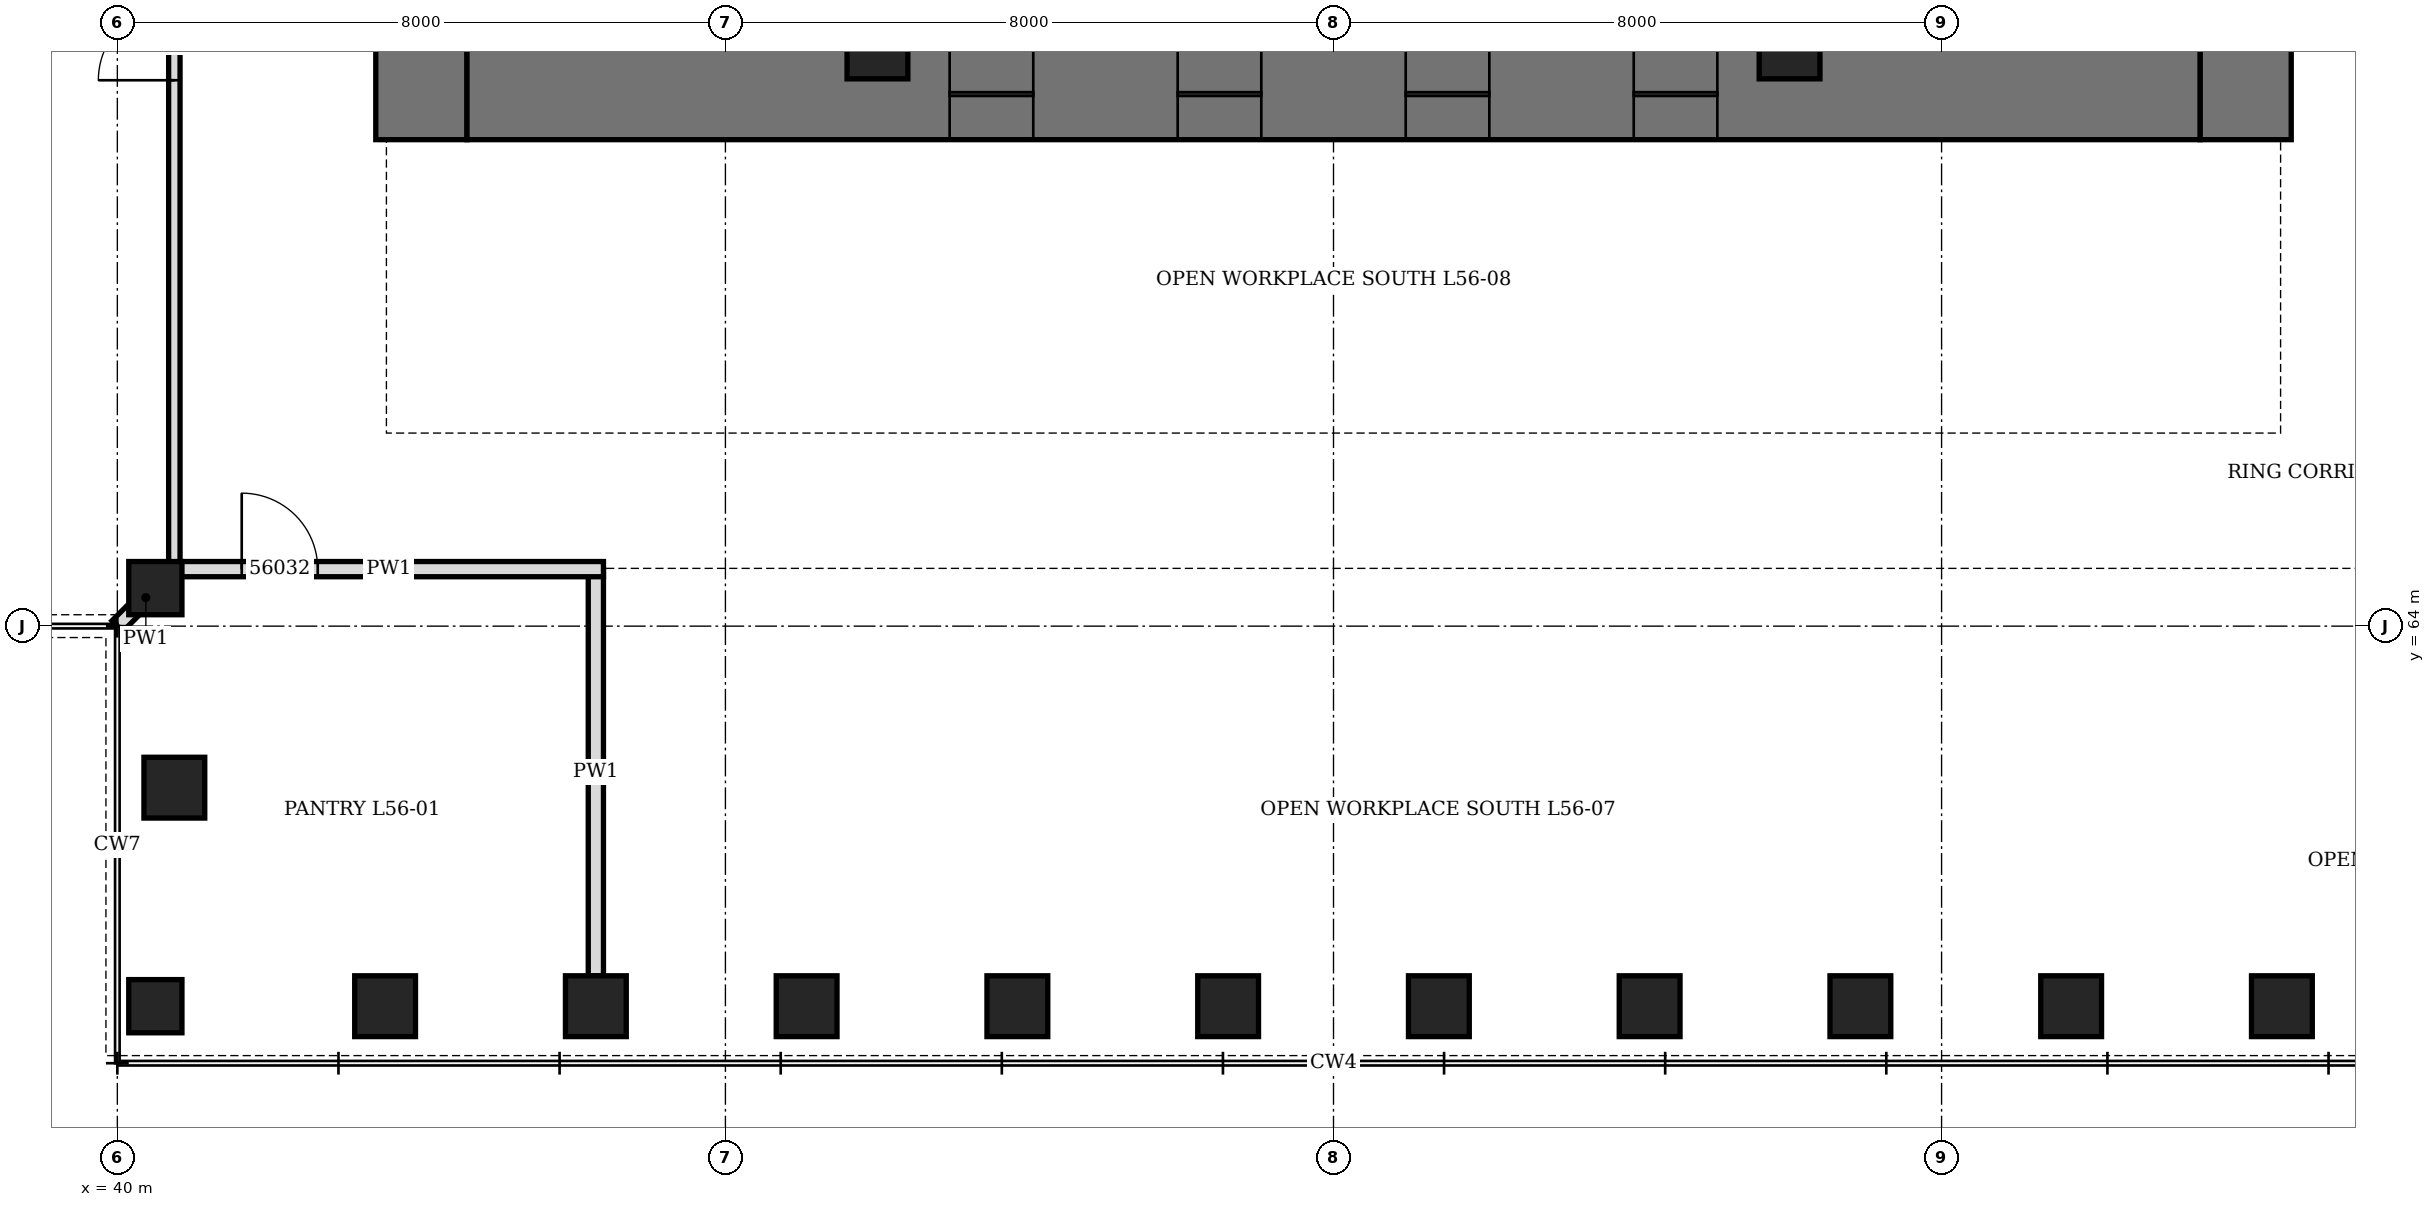
"""IFC4 building model, lengths in metres.
Left out: names, types, materials, properties, quantities, classifications, styles, units other than length and angle.
Written with IfcOpenShell. Run it as: python <this file> out.ifc"""

import sys

from ifc_helpers import new_model, si_unit, direction, frame, frame_2d, origin, origin_2d, place, context, subcontext, project, spatial, rectangle, hollow_rectangle, extrude, clip, halfspace, element, fill, save


model = new_model("IFC4")
c1 = context("Model", 3, precision=1e-05, world=origin(), true_north=direction((0.0, 1.0)))
c2 = subcontext(c1, "Body", "Model", "MODEL_VIEW")
j1 = project(units=[si_unit("LENGTHUNIT", "METRE"), si_unit("PLANEANGLEUNIT", "RADIAN")], contexts=[c1])
p1 = place(None, origin())
s1 = spatial("IfcSite", under=j1, at=p1, CompositionType="ELEMENT")
p2 = place(p1, origin())
s2 = spatial("IfcBuilding", under=s1, at=p2, CompositionType="ELEMENT")
p3 = place(p2, frame((0.0, 0.0, 250.3)))
s3 = spatial("IfcBuildingStorey", under=s2, at=p3, CompositionType="ELEMENT", Elevation=250.3)
p4 = place(p3, frame((40.5, 59.0, -0.16), z_axis=(0.057244014902, 0.0, 0.998360216935), x_axis=(0.0, 1.0, 0.0)))
e1 = element("IfcColumn", 1, at=p4, inside=s3, PredefinedType="COLUMN", context=c2, shape_type="Clipping", body=[
    clip(clip(extrude(hollow_rectangle(XDim=0.7, YDim=0.7, WallThickness=0.08, at=origin_2d()), origin(), (0.0, 0.0, 1.0), 4.367), halfspace(frame((0.0, 0.0, 0.022), z_axis=(0.0, 0.0, 1.0), x_axis=(1.0, 0.0, 0.0)), True)), halfspace(frame((0.0, 0.0, 4.345), z_axis=(0.0, 0.0, -1.0), x_axis=(1.0, 0.0, 0.0)), True)),
])
for number, where, z_axis, x_axis in (
    (2, (43.523, 59.0, -0.16), (0.0, 0.0, 1.0), (1.0, 0.0, 0.0)),
    (3, (46.295, 59.0, -0.16), (0.0, 0.0, 1.0), (1.0, 0.0, 0.0)),
    (4, (49.068, 59.0, -0.16), (0.0, 0.0, 1.0), (1.0, 0.0, 0.0)),
    (5, (51.841, 59.0, -0.16), (0.0, 0.0, 1.0), (1.0, 0.0, 0.0)),
    (6, (54.614, 59.0, -0.16), (0.0, 0.0, 1.0), (1.0, 0.0, 0.0)),
    (7, (57.386, 59.0, -0.16), (0.0, 0.0, 1.0), (1.0, 0.0, 0.0)),
    (8, (60.159, 59.0, -0.16), (0.0, 0.0, 1.0), (1.0, 0.0, 0.0)),
    (9, (62.932, 59.0, -0.16), (0.0, 0.0, 1.0), (1.0, 0.0, 0.0)),
    (10, (65.705, 59.0, -0.16), (0.0, 0.0, 1.0), (1.0, 0.0, 0.0)),
    (11, (68.477, 59.0, -0.16), (0.0, 0.0, 1.0), (1.0, 0.0, 0.0)),
):
    element("IfcColumn", number, at=place(p3, frame(where, z_axis=z_axis, x_axis=x_axis)), inside=s3, PredefinedType="COLUMN", context=c2, shape_type="SweptSolid", body=[
        extrude(hollow_rectangle(XDim=0.8, YDim=0.8, WallThickness=0.1, at=origin_2d()), origin(), (0.0, 0.0, 1.0), 4.36),
    ])
p5 = place(p3, frame((40.5, 64.5, -0.16), z_axis=(0.057150453976, 0.057150453976, 0.99672847417), x_axis=(-0.707106781187, 0.707106781187, 0.0)))
e12 = element("IfcColumn", 12, at=p5, inside=s3, PredefinedType="COLUMN", context=c2, shape_type="Clipping", body=[
    clip(clip(extrude(hollow_rectangle(XDim=0.7, YDim=0.7, WallThickness=0.08, at=origin_2d()), origin(), (0.0, 0.0, 1.0), 4.375), halfspace(frame((0.0, 0.0, 0.031), z_axis=(0.0, 0.0, 1.0), x_axis=(1.0, 0.0, 0.0)), True)), halfspace(frame((0.0, 0.0, 4.344), z_axis=(0.0, 0.0, -1.0), x_axis=(1.0, 0.0, 0.0)), True)),
])
p6 = place(p3, frame((40.75, 61.875, -0.16), z_axis=(0.0, 0.0, 1.0), x_axis=(0.0, 1.0, 0.0)))
e13 = element("IfcColumn", 13, at=p6, inside=s3, PredefinedType="COLUMN", context=c2, shape_type="SweptSolid", body=[
    extrude(hollow_rectangle(XDim=0.8, YDim=0.8, WallThickness=0.1, at=origin_2d()), origin(), (0.0, 0.0, 1.0), 4.36),
])
p7 = place(p3, frame((44.0, 70.4, 0.0), z_axis=(0.0, 0.0, 1.0), x_axis=(0.0, 1.0, 0.0)))
e14 = element("IfcWall", 14, at=p7, inside=s3, PredefinedType="SHEAR", context=c2, shape_type="SweptSolid", body=[
    extrude(rectangle(XDim=19.2, YDim=1.2, at=frame_2d((9.6, 0.0))), origin(), (0.0, 0.0, 1.0), 4.2),
])
p8 = place(p7, frame((8.6, 0.0, 0.0)))
e15 = element("IfcOpeningElement", 15, at=p8, cuts=e14, PredefinedType="OPENING", context=c2, shape_type="SweptSolid", body=[
    extrude(rectangle(XDim=2.0, YDim=2.4, at=frame_2d((1.0, 1.2))), frame((0.0, 0.61, 0.0), z_axis=(0.0, -1.0, 0.0), x_axis=(1.0, 0.0, 0.0)), (0.0, 0.0, 1.0), 1.22),
])
p9 = place(p3, frame((68.0, 70.4, 0.0), z_axis=(0.0, 0.0, 1.0), x_axis=(0.0, 1.0, 0.0)))
e16 = element("IfcWall", 16, at=p9, inside=s3, PredefinedType="SHEAR", context=c2, shape_type="SweptSolid", body=[
    extrude(rectangle(XDim=19.2, YDim=1.2, at=frame_2d((9.6, 0.0))), origin(), (0.0, 0.0, 1.0), 4.2),
])
p10 = place(p9, frame((8.6, 0.0, 0.0)))
e17 = element("IfcOpeningElement", 17, at=p10, cuts=e16, PredefinedType="OPENING", context=c2, shape_type="SweptSolid", body=[
    extrude(rectangle(XDim=2.0, YDim=2.4, at=frame_2d((1.0, 1.2))), frame((0.0, 0.61, 0.0), z_axis=(0.0, -1.0, 0.0), x_axis=(1.0, 0.0, 0.0)), (0.0, 0.0, 1.0), 1.22),
])
p11 = place(p3, frame((44.6, 71.0, 0.0), z_axis=(0.0, 0.0, 1.0), x_axis=(1.0, 0.0, 0.0)))
e18 = element("IfcWall", 18, at=p11, inside=s3, PredefinedType="SHEAR", context=c2, shape_type="SweptSolid", body=[
    extrude(rectangle(XDim=22.8, YDim=1.2, at=frame_2d((11.4, 0.0))), origin(), (0.0, 0.0, 1.0), 4.2),
])
p12 = place(p11, frame((6.35, 0.0, 0.0)))
e19 = element("IfcOpeningElement", 19, at=p12, cuts=e18, PredefinedType="OPENING", context=c2, shape_type="SweptSolid", body=[
    extrude(rectangle(XDim=1.1, YDim=2.2, at=frame_2d((0.55, 1.1))), frame((0.0, 0.61, 0.0), z_axis=(0.0, -1.0, 0.0), x_axis=(1.0, 0.0, 0.0)), (0.0, 0.0, 1.0), 1.22),
])
p13 = place(p11, frame((9.35, 0.0, 0.0)))
e20 = element("IfcOpeningElement", 20, at=p13, cuts=e18, PredefinedType="OPENING", context=c2, shape_type="SweptSolid", body=[
    extrude(rectangle(XDim=1.1, YDim=2.2, at=frame_2d((0.55, 1.1))), frame((0.0, 0.61, 0.0), z_axis=(0.0, -1.0, 0.0), x_axis=(1.0, 0.0, 0.0)), (0.0, 0.0, 1.0), 1.22),
])
p14 = place(p11, frame((12.35, 0.0, 0.0)))
e21 = element("IfcOpeningElement", 21, at=p14, cuts=e18, PredefinedType="OPENING", context=c2, shape_type="SweptSolid", body=[
    extrude(rectangle(XDim=1.1, YDim=2.2, at=frame_2d((0.55, 1.1))), frame((0.0, 0.61, 0.0), z_axis=(0.0, -1.0, 0.0), x_axis=(1.0, 0.0, 0.0)), (0.0, 0.0, 1.0), 1.22),
])
p15 = place(p11, frame((15.35, 0.0, 0.0)))
e22 = element("IfcOpeningElement", 22, at=p15, cuts=e18, PredefinedType="OPENING", context=c2, shape_type="SweptSolid", body=[
    extrude(rectangle(XDim=1.1, YDim=2.2, at=frame_2d((0.55, 1.1))), frame((0.0, 0.61, 0.0), z_axis=(0.0, -1.0, 0.0), x_axis=(1.0, 0.0, 0.0)), (0.0, 0.0, 1.0), 1.22),
])
for number, where, z_axis, x_axis in (
    (23, (50.0, 71.6, 0.0), (0.0, 0.0, 1.0), (1.0, 0.0, 0.0)),
    (24, (62.0, 71.6, 0.0), (0.0, 0.0, 1.0), (1.0, 0.0, 0.0)),
):
    element("IfcColumn", number, at=place(p3, frame(where, z_axis=z_axis, x_axis=x_axis)), inside=s3, PredefinedType="COLUMN", context=c2, shape_type="SweptSolid", body=[
        extrude(hollow_rectangle(XDim=0.8, YDim=0.8, WallThickness=0.1, at=origin_2d()), origin(), (0.0, 0.0, 1.0), 4.2),
    ])
p16 = place(p3, frame((46.295, 59.4, 0.0), z_axis=(0.0, 0.0, 1.0), x_axis=(0.0, 1.0, 0.0)))
e25 = element("IfcWall", 25, at=p16, inside=s3, PredefinedType="PARTITIONING", context=c2, shape_type="SweptSolid", body=[
    extrude(rectangle(XDim=5.35, YDim=0.2, at=frame_2d((2.675, 0.0))), origin(), (0.0, 0.0, 1.0), 3.428),
])
p17 = place(p3, frame((40.75, 64.75, 0.0), z_axis=(0.0, 0.0, 1.0), x_axis=(1.0, 0.0, 0.0)))
e26 = element("IfcWall", 26, at=p17, inside=s3, PredefinedType="PARTITIONING", context=c2, shape_type="SweptSolid", body=[
    extrude(rectangle(XDim=5.646, YDim=0.2, at=frame_2d((2.823, 0.0))), origin(), (0.0, 0.0, 1.0), 4.04),
])
p18 = place(p17, frame((0.886, 0.0, 0.0)))
e27 = element("IfcOpeningElement", 27, at=p18, cuts=e26, PredefinedType="OPENING", context=c2, shape_type="SweptSolid", body=[
    extrude(rectangle(XDim=1.0, YDim=2.1, at=frame_2d((0.5, 1.05))), frame((0.0, 0.11, 0.0), z_axis=(0.0, -1.0, 0.0), x_axis=(1.0, 0.0, 0.0)), (0.0, 0.0, 1.0), 0.22),
])
p19 = place(p3, frame((40.75, 64.75, 0.0), z_axis=(0.0, 0.0, 1.0), x_axis=(0.0, 1.0, 0.0)))
e28 = element("IfcWall", 28, at=p19, inside=s3, PredefinedType="PARTITIONING", context=c2, shape_type="SweptSolid", body=[
    extrude(rectangle(XDim=16.736, YDim=0.15, at=frame_2d((8.368, 0.0))), origin(), (0.0, 0.0, 1.0), 4.04),
])
p20 = place(p19, frame((6.432, 0.0, 0.0)))
e29 = element("IfcOpeningElement", 29, at=p20, cuts=e28, PredefinedType="OPENING", context=c2, shape_type="SweptSolid", body=[
    extrude(rectangle(XDim=1.0, YDim=2.4, at=frame_2d((0.5, 1.2))), frame((0.0, 0.085, 0.0), z_axis=(0.0, -1.0, 0.0), x_axis=(1.0, 0.0, 0.0)), (0.0, 0.0, 1.0), 0.17),
])
p21 = place(p3, frame((40.75, 64.75, 0.0), z_axis=(0.0, 0.0, 1.0), x_axis=(-0.707106781187, -0.707106781187, 0.0)))
e30 = element("IfcWall", 30, at=p21, inside=s3, PredefinedType="PARTITIONING", context=c2, shape_type="SweptSolid", body=[
    extrude(rectangle(XDim=1.061, YDim=0.2, at=frame_2d((0.53, 0.0))), origin(), (0.0, 0.0, 1.0), 4.04),
])
p22 = place(p12, origin())
e31 = element("IfcDoor", 31, at=p22, inside=s3, OperationType="SLIDING_TO_LEFT", PredefinedType="DOOR", context=c2, shape_type="SweptSolid", body=[
    extrude(rectangle(XDim=1.1, YDim=2.2, at=frame_2d((0.55, 1.1))), frame((0.0, 0.35, 0.0), z_axis=(0.0, -1.0, 0.0), x_axis=(1.0, 0.0, 0.0)), (0.0, 0.0, 1.0), 0.7),
])
fill(e19, e31)
p23 = place(p13, origin())
e32 = element("IfcDoor", 32, at=p23, inside=s3, OperationType="SLIDING_TO_LEFT", PredefinedType="DOOR", context=c2, shape_type="SweptSolid", body=[
    extrude(rectangle(XDim=1.1, YDim=2.2, at=frame_2d((0.55, 1.1))), frame((0.0, 0.35, 0.0), z_axis=(0.0, -1.0, 0.0), x_axis=(1.0, 0.0, 0.0)), (0.0, 0.0, 1.0), 0.7),
])
fill(e20, e32)
p24 = place(p14, origin())
e33 = element("IfcDoor", 33, at=p24, inside=s3, OperationType="SLIDING_TO_LEFT", PredefinedType="DOOR", context=c2, shape_type="SweptSolid", body=[
    extrude(rectangle(XDim=1.1, YDim=2.2, at=frame_2d((0.55, 1.1))), frame((0.0, 0.35, 0.0), z_axis=(0.0, -1.0, 0.0), x_axis=(1.0, 0.0, 0.0)), (0.0, 0.0, 1.0), 0.7),
])
fill(e21, e33)
p25 = place(p15, origin())
e34 = element("IfcDoor", 34, at=p25, inside=s3, OperationType="SLIDING_TO_LEFT", PredefinedType="DOOR", context=c2, shape_type="SweptSolid", body=[
    extrude(rectangle(XDim=1.1, YDim=2.2, at=frame_2d((0.55, 1.1))), frame((0.0, 0.35, 0.0), z_axis=(0.0, -1.0, 0.0), x_axis=(1.0, 0.0, 0.0)), (0.0, 0.0, 1.0), 0.7),
])
fill(e22, e34)
p26 = place(p18, origin())
e35 = element("IfcDoor", 35, at=p26, inside=s3, OperationType="SINGLE_SWING_LEFT", PredefinedType="DOOR", context=c2, shape_type="SweptSolid", body=[
    extrude(rectangle(XDim=1.0, YDim=2.1, at=frame_2d((0.5, 1.05))), frame((0.0, 0.1, 0.0), z_axis=(0.0, -1.0, 0.0), x_axis=(1.0, 0.0, 0.0)), (0.0, 0.0, 1.0), 0.199),
])
fill(e27, e35)
p27 = place(p20, origin())
e36 = element("IfcDoor", 36, at=p27, inside=s3, OperationType="SINGLE_SWING_RIGHT", PredefinedType="DOOR", context=c2, shape_type="SweptSolid", body=[
    extrude(rectangle(XDim=1.0, YDim=2.4, at=frame_2d((0.5, 1.2))), frame((0.0, 0.075, 0.0), z_axis=(0.0, -1.0, 0.0), x_axis=(1.0, 0.0, 0.0)), (0.0, 0.0, 1.0), 0.149),
])
fill(e29, e36)
save(model, sys.argv[1])
